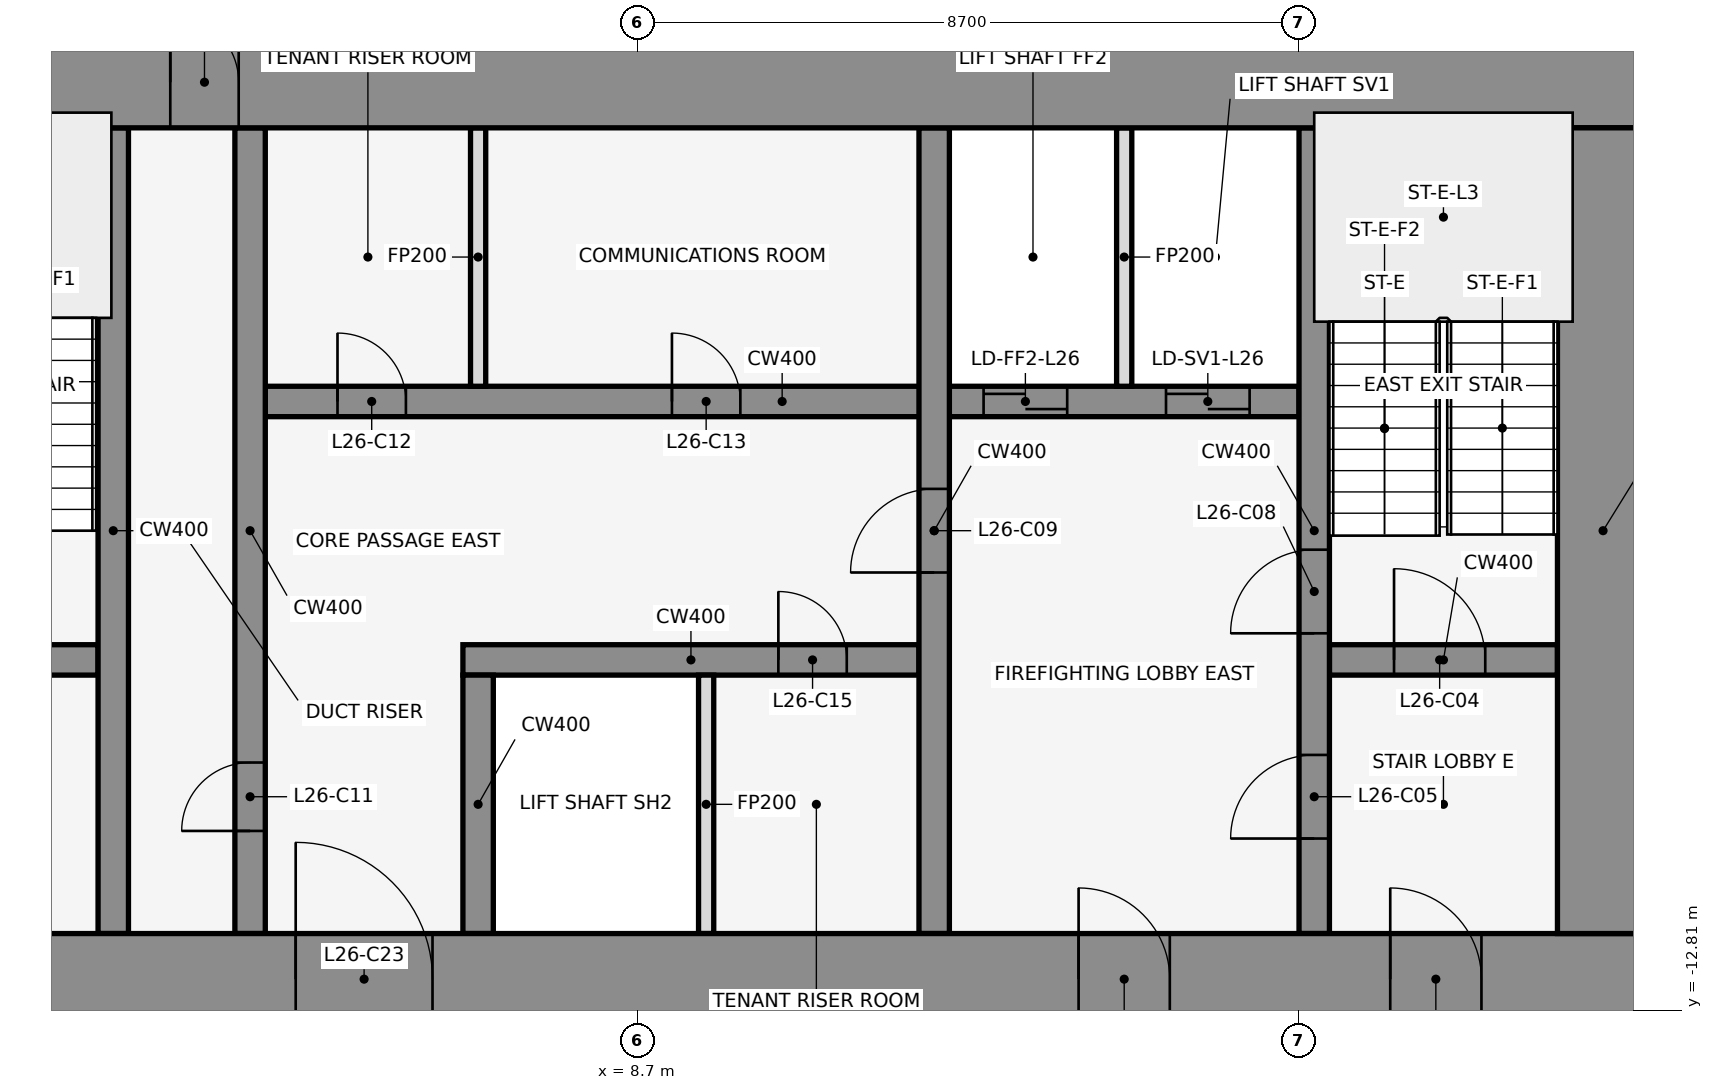
"""IFC4 building model, lengths in metres.
Left out: names, types, materials, properties, quantities, classifications, styles, units other than length and angle.
Written with IfcOpenShell. Run it as: python <this file> out.ifc"""

import sys

from ifc_helpers import new_model, si_unit, direction, frame, frame_2d, origin, place, context, subcontext, project, spatial, rectangle, extrude, element, fill, save


model = new_model("IFC4")
c1 = context("Model", 3, precision=1e-05, world=origin(), true_north=direction((0.0, 1.0)))
c2 = subcontext(c1, "Body", "Model", "MODEL_VIEW")
j1 = project(units=[si_unit("LENGTHUNIT", "METRE"), si_unit("PLANEANGLEUNIT", "RADIAN")], contexts=[c1])
p1 = place(None, origin())
s1 = spatial("IfcSite", under=j1, at=p1, CompositionType="ELEMENT")
p2 = place(p1, origin())
s2 = spatial("IfcBuilding", under=s1, at=p2, CompositionType="ELEMENT")
p3 = place(p2, frame((0.0, 0.0, 122.7)))
s3 = spatial("IfcBuildingStorey", under=s2, at=p3, CompositionType="ELEMENT", Elevation=122.7)
for number, where, z_axis, x_axis in (
    (1, (16.432, -0.105, 0.0), (0.0, 0.0, 1.0), (-0.84, 0.543, 0.0)),
    (2, (1.901, 1.08, 0.0), (0.0, 0.0, 1.0), (-0.84, -0.543, 0.0)),
):
    element("IfcWall", number, at=place(p3, frame(where, z_axis=z_axis, x_axis=x_axis)), inside=s3, PredefinedType="STANDARD", context=c2, shape_type="SweptSolid", body=[
        extrude(rectangle(XDim=2.183, YDim=0.25, at=frame_2d((1.091, 0.0))), origin(), (0.0, 0.0, 1.0), 3.95),
    ])
p4 = place(p3, frame((-1.6, -8.2, 0.0), z_axis=(0.0, 0.0, 1.0), x_axis=(1.0, 0.0, 0.0)))
e3 = element("IfcWall", 3, at=p4, inside=s3, PredefinedType="SHEAR", context=c2, shape_type="SweptSolid", body=[
    extrude(rectangle(XDim=3.2, YDim=0.4, at=frame_2d((1.6, 0.0))), origin(), (0.0, 0.0, 1.0), 4.1),
])
p5 = place(p4, frame((1.05, 0.0, 0.0)))
e4 = element("IfcOpeningElement", 4, at=p5, cuts=e3, PredefinedType="OPENING", context=c2, shape_type="SweptSolid", body=[
    extrude(rectangle(XDim=1.2, YDim=2.1, at=frame_2d((0.6, 1.05))), frame((0.0, 0.212, 0.0), z_axis=(0.0, -1.0, 0.0), x_axis=(1.0, 0.0, 0.0)), (0.0, 0.0, 1.0), 0.424),
])
p6 = place(p3, frame((6.4, -8.2, 0.0), z_axis=(0.0, 0.0, 1.0), x_axis=(1.0, 0.0, 0.0)))
e5 = element("IfcWall", 5, at=p6, inside=s3, PredefinedType="SHEAR", context=c2, shape_type="SweptSolid", body=[
    extrude(rectangle(XDim=6.0, YDim=0.4, at=frame_2d((3.0, 0.0))), origin(), (0.0, 0.0, 1.0), 4.1),
])
p7 = place(p6, frame((4.15, 0.0, 0.0)))
e6 = element("IfcOpeningElement", 6, at=p7, cuts=e5, PredefinedType="OPENING", context=c2, shape_type="SweptSolid", body=[
    extrude(rectangle(XDim=0.9, YDim=2.1, at=frame_2d((0.45, 1.05))), frame((0.0, 0.212, 0.0), z_axis=(0.0, -1.0, 0.0), x_axis=(1.0, 0.0, 0.0)), (0.0, 0.0, 1.0), 0.424),
])
p8 = place(p3, frame((17.8, -8.2, 0.0), z_axis=(0.0, 0.0, 1.0), x_axis=(1.0, 0.0, 0.0)))
e7 = element("IfcWall", 7, at=p8, inside=s3, PredefinedType="SHEAR", context=c2, shape_type="SweptSolid", body=[
    extrude(rectangle(XDim=3.0, YDim=0.4, at=frame_2d((1.5, 0.0))), origin(), (0.0, 0.0, 1.0), 4.1),
])
p9 = place(p8, frame((0.85, 0.0, 0.0)))
e8 = element("IfcOpeningElement", 8, at=p9, cuts=e7, PredefinedType="OPENING", context=c2, shape_type="SweptSolid", body=[
    extrude(rectangle(XDim=1.2, YDim=2.1, at=frame_2d((0.6, 1.05))), frame((0.0, 0.212, 0.0), z_axis=(0.0, -1.0, 0.0), x_axis=(1.0, 0.0, 0.0)), (0.0, 0.0, 1.0), 0.424),
])
p10 = place(p3, frame((3.8, -4.8, 0.0), z_axis=(0.0, 0.0, 1.0), x_axis=(1.0, 0.0, 0.0)))
e9 = element("IfcWall", 9, at=p10, inside=s3, PredefinedType="SHEAR", context=c2, shape_type="SweptSolid", body=[
    extrude(rectangle(XDim=13.6, YDim=0.4, at=frame_2d((6.8, 0.0))), origin(), (0.0, 0.0, 1.0), 4.1),
])
p11 = place(p10, frame((9.45, 0.0, 0.0)))
e10 = element("IfcOpeningElement", 10, at=p11, cuts=e9, PredefinedType="OPENING", context=c2, shape_type="SweptSolid", body=[
    extrude(rectangle(XDim=1.1, YDim=2.1, at=frame_2d((0.55, 1.05))), frame((0.0, 0.212, 0.0), z_axis=(0.0, -1.0, 0.0), x_axis=(1.0, 0.0, 0.0)), (0.0, 0.0, 1.0), 0.424),
])
p12 = place(p10, frame((11.85, 0.0, 0.0)))
e11 = element("IfcOpeningElement", 11, at=p12, cuts=e9, PredefinedType="OPENING", context=c2, shape_type="SweptSolid", body=[
    extrude(rectangle(XDim=1.1, YDim=2.1, at=frame_2d((0.55, 1.05))), frame((0.0, 0.212, 0.0), z_axis=(0.0, -1.0, 0.0), x_axis=(1.0, 0.0, 0.0)), (0.0, 0.0, 1.0), 0.424),
])
p13 = place(p10, frame((0.95, 0.0, 0.0)))
e12 = element("IfcOpeningElement", 12, at=p13, cuts=e9, PredefinedType="OPENING", context=c2, shape_type="SweptSolid", body=[
    extrude(rectangle(XDim=0.9, YDim=2.1, at=frame_2d((0.45, 1.05))), frame((0.0, 0.212, 0.0), z_axis=(0.0, -1.0, 0.0), x_axis=(1.0, 0.0, 0.0)), (0.0, 0.0, 1.0), 0.424),
])
p14 = place(p10, frame((5.35, 0.0, 0.0)))
e13 = element("IfcOpeningElement", 13, at=p14, cuts=e9, PredefinedType="OPENING", context=c2, shape_type="SweptSolid", body=[
    extrude(rectangle(XDim=0.9, YDim=2.1, at=frame_2d((0.45, 1.05))), frame((0.0, 0.212, 0.0), z_axis=(0.0, -1.0, 0.0), x_axis=(1.0, 0.0, 0.0)), (0.0, 0.0, 1.0), 0.424),
])
p15 = place(p3, frame((1.8, -11.8, 0.0), z_axis=(0.0, 0.0, 1.0), x_axis=(0.0, 1.0, 0.0)))
e14 = element("IfcWall", 14, at=p15, inside=s3, PredefinedType="SHEAR", context=c2, shape_type="SweptSolid", body=[
    extrude(rectangle(XDim=10.6, YDim=0.4, at=frame_2d((5.3, 0.0))), origin(), (0.0, 0.0, 1.0), 4.1),
])
p16 = place(p3, frame((3.6, -11.8, 0.0), z_axis=(0.0, 0.0, 1.0), x_axis=(0.0, 1.0, 0.0)))
e15 = element("IfcWall", 15, at=p16, inside=s3, PredefinedType="SHEAR", context=c2, shape_type="SweptSolid", body=[
    extrude(rectangle(XDim=10.6, YDim=0.4, at=frame_2d((5.3, 0.0))), origin(), (0.0, 0.0, 1.0), 4.1),
])
p17 = place(p16, frame((1.35, 0.0, 0.0)))
e16 = element("IfcOpeningElement", 16, at=p17, cuts=e15, PredefinedType="OPENING", context=c2, shape_type="SweptSolid", body=[
    extrude(rectangle(XDim=0.9, YDim=2.1, at=frame_2d((0.45, 1.05))), frame((0.0, 0.212, 0.0), z_axis=(0.0, -1.0, 0.0), x_axis=(1.0, 0.0, 0.0)), (0.0, 0.0, 1.0), 0.424),
])
p18 = place(p3, frame((6.6, -11.8, 0.0), z_axis=(0.0, 0.0, 1.0), x_axis=(0.0, 1.0, 0.0)))
e17 = element("IfcWall", 17, at=p18, inside=s3, PredefinedType="SHEAR", context=c2, shape_type="SweptSolid", body=[
    extrude(rectangle(XDim=3.4, YDim=0.4, at=frame_2d((1.7, 0.0))), origin(), (0.0, 0.0, 1.0), 4.1),
])
for number, where, z_axis, x_axis in (
    (18, (6.6, -4.6, 0.0), (0.0, 0.0, 1.0), (0.0, 1.0, 0.0)),
    (19, (9.6, -11.8, 0.0), (0.0, 0.0, 1.0), (0.0, 1.0, 0.0)),
):
    element("IfcWall", number, at=place(p3, frame(where, z_axis=z_axis, x_axis=x_axis)), inside=s3, PredefinedType="PARTITIONING", context=c2, shape_type="SweptSolid", body=[
        extrude(rectangle(XDim=3.4, YDim=0.2, at=frame_2d((1.7, 0.0))), origin(), (0.0, 0.0, 1.0), 3.018),
    ])
p19 = place(p3, frame((12.6, -11.8, 0.0), z_axis=(0.0, 0.0, 1.0), x_axis=(0.0, 1.0, 0.0)))
e20 = element("IfcWall", 20, at=p19, inside=s3, PredefinedType="SHEAR", context=c2, shape_type="SweptSolid", body=[
    extrude(rectangle(XDim=10.6, YDim=0.4, at=frame_2d((5.3, 0.0))), origin(), (0.0, 0.0, 1.0), 4.1),
])
p20 = place(p19, frame((4.75, 0.0, 0.0)))
e21 = element("IfcOpeningElement", 21, at=p20, cuts=e20, PredefinedType="OPENING", context=c2, shape_type="SweptSolid", body=[
    extrude(rectangle(XDim=1.1, YDim=2.1, at=frame_2d((0.55, 1.05))), frame((0.0, 0.212, 0.0), z_axis=(0.0, -1.0, 0.0), x_axis=(1.0, 0.0, 0.0)), (0.0, 0.0, 1.0), 0.424),
])
p21 = place(p3, frame((15.1, -4.6, 0.0), z_axis=(0.0, 0.0, 1.0), x_axis=(0.0, 1.0, 0.0)))
e22 = element("IfcWall", 22, at=p21, inside=s3, PredefinedType="PARTITIONING", context=c2, shape_type="SweptSolid", body=[
    extrude(rectangle(XDim=3.4, YDim=0.2, at=frame_2d((1.7, 0.0))), origin(), (0.0, 0.0, 1.0), 3.018),
])
p22 = place(p3, frame((17.6, -11.8, 0.0), z_axis=(0.0, 0.0, 1.0), x_axis=(0.0, 1.0, 0.0)))
e23 = element("IfcWall", 23, at=p22, inside=s3, PredefinedType="SHEAR", context=c2, shape_type="SweptSolid", body=[
    extrude(rectangle(XDim=10.6, YDim=0.4, at=frame_2d((5.3, 0.0))), origin(), (0.0, 0.0, 1.0), 4.1),
])
p23 = place(p22, frame((1.25, 0.0, 0.0)))
e24 = element("IfcOpeningElement", 24, at=p23, cuts=e23, PredefinedType="OPENING", context=c2, shape_type="SweptSolid", body=[
    extrude(rectangle(XDim=1.1, YDim=2.1, at=frame_2d((0.55, 1.05))), frame((0.0, 0.212, 0.0), z_axis=(0.0, -1.0, 0.0), x_axis=(1.0, 0.0, 0.0)), (0.0, 0.0, 1.0), 0.424),
])
p24 = place(p22, frame((3.95, 0.0, 0.0)))
e25 = element("IfcOpeningElement", 25, at=p24, cuts=e23, PredefinedType="OPENING", context=c2, shape_type="SweptSolid", body=[
    extrude(rectangle(XDim=1.1, YDim=2.1, at=frame_2d((0.55, 1.05))), frame((0.0, 0.212, 0.0), z_axis=(0.0, -1.0, 0.0), x_axis=(1.0, 0.0, 0.0)), (0.0, 0.0, 1.0), 0.424),
])
p25 = place(p3, frame((-22.0, -0.6, 0.0), z_axis=(0.0, 0.0, 1.0), x_axis=(1.0, 0.0, 0.0)))
e26 = element("IfcWall", 26, at=p25, inside=s3, PredefinedType="SHEAR", context=c2, shape_type="SweptSolid", body=[
    extrude(rectangle(XDim=44.0, YDim=1.2, at=frame_2d((22.0, 0.0))), origin(), (0.0, 0.0, 1.0), 4.1),
])
p26 = place(p25, frame((18.55, 0.0, 0.0)))
e27 = element("IfcOpeningElement", 27, at=p26, cuts=e26, PredefinedType="OPENING", context=c2, shape_type="SweptSolid", body=[
    extrude(rectangle(XDim=0.9, YDim=2.1, at=frame_2d((0.45, 1.05))), frame((0.0, 0.612, 0.0), z_axis=(0.0, -1.0, 0.0), x_axis=(1.0, 0.0, 0.0)), (0.0, 0.0, 1.0), 1.224),
])
p27 = place(p25, frame((24.55, 0.0, 0.0)))
e28 = element("IfcOpeningElement", 28, at=p27, cuts=e26, PredefinedType="OPENING", context=c2, shape_type="SweptSolid", body=[
    extrude(rectangle(XDim=0.9, YDim=2.1, at=frame_2d((0.45, 1.05))), frame((0.0, 0.612, 0.0), z_axis=(0.0, -1.0, 0.0), x_axis=(1.0, 0.0, 0.0)), (0.0, 0.0, 1.0), 1.224),
])
p28 = place(p3, frame((-22.0, -12.4, 0.0), z_axis=(0.0, 0.0, 1.0), x_axis=(1.0, 0.0, 0.0)))
e29 = element("IfcWall", 29, at=p28, inside=s3, PredefinedType="SHEAR", context=c2, shape_type="SweptSolid", body=[
    extrude(rectangle(XDim=44.0, YDim=1.2, at=frame_2d((22.0, 0.0))), origin(), (0.0, 0.0, 1.0), 4.1),
])
p29 = place(p28, frame((2.2, 0.0, 0.0)))
e30 = element("IfcOpeningElement", 30, at=p29, cuts=e29, PredefinedType="OPENING", context=c2, shape_type="SweptSolid", body=[
    extrude(rectangle(XDim=1.2, YDim=2.1, at=frame_2d((0.6, 1.05))), frame((0.0, 0.612, 0.0), z_axis=(0.0, -1.0, 0.0), x_axis=(1.0, 0.0, 0.0)), (0.0, 0.0, 1.0), 1.224),
])
p30 = place(p28, frame((21.4, 0.0, 0.0)))
e31 = element("IfcOpeningElement", 31, at=p30, cuts=e29, PredefinedType="OPENING", context=c2, shape_type="SweptSolid", body=[
    extrude(rectangle(XDim=1.2, YDim=2.1, at=frame_2d((0.6, 1.05))), frame((0.0, 0.612, 0.0), z_axis=(0.0, -1.0, 0.0), x_axis=(1.0, 0.0, 0.0)), (0.0, 0.0, 1.0), 1.224),
])
p31 = place(p28, frame((40.6, 0.0, 0.0)))
e32 = element("IfcOpeningElement", 32, at=p31, cuts=e29, PredefinedType="OPENING", context=c2, shape_type="SweptSolid", body=[
    extrude(rectangle(XDim=1.2, YDim=2.1, at=frame_2d((0.6, 1.05))), frame((0.0, 0.612, 0.0), z_axis=(0.0, -1.0, 0.0), x_axis=(1.0, 0.0, 0.0)), (0.0, 0.0, 1.0), 1.224),
])
p32 = place(p28, frame((16.0, 0.0, 0.0)))
e33 = element("IfcOpeningElement", 33, at=p32, cuts=e29, PredefinedType="OPENING", context=c2, shape_type="SweptSolid", body=[
    extrude(rectangle(XDim=1.8, YDim=2.1, at=frame_2d((0.9, 1.05))), frame((0.0, 0.612, 0.0), z_axis=(0.0, -1.0, 0.0), x_axis=(1.0, 0.0, 0.0)), (0.0, 0.0, 1.0), 1.224),
])
p33 = place(p28, frame((6.3, 0.0, 0.0)))
e34 = element("IfcOpeningElement", 34, at=p33, cuts=e29, PredefinedType="OPENING", context=c2, shape_type="SweptSolid", body=[
    extrude(rectangle(XDim=1.2, YDim=2.1, at=frame_2d((0.6, 1.05))), frame((0.0, 0.612, 0.0), z_axis=(0.0, -1.0, 0.0), x_axis=(1.0, 0.0, 0.0)), (0.0, 0.0, 1.0), 1.224),
])
p34 = place(p28, frame((26.2, 0.0, 0.0)))
e35 = element("IfcOpeningElement", 35, at=p34, cuts=e29, PredefinedType="OPENING", context=c2, shape_type="SweptSolid", body=[
    extrude(rectangle(XDim=1.8, YDim=2.1, at=frame_2d((0.9, 1.05))), frame((0.0, 0.612, 0.0), z_axis=(0.0, -1.0, 0.0), x_axis=(1.0, 0.0, 0.0)), (0.0, 0.0, 1.0), 1.224),
])
p35 = place(p28, frame((36.5, 0.0, 0.0)))
e36 = element("IfcOpeningElement", 36, at=p35, cuts=e29, PredefinedType="OPENING", context=c2, shape_type="SweptSolid", body=[
    extrude(rectangle(XDim=1.2, YDim=2.1, at=frame_2d((0.6, 1.05))), frame((0.0, 0.612, 0.0), z_axis=(0.0, -1.0, 0.0), x_axis=(1.0, 0.0, 0.0)), (0.0, 0.0, 1.0), 1.224),
])
p36 = place(p3, frame((21.4, -11.8, 0.0), z_axis=(0.0, 0.0, 1.0), x_axis=(0.0, 1.0, 0.0)))
e37 = element("IfcWall", 37, at=p36, inside=s3, PredefinedType="SHEAR", context=c2, shape_type="SweptSolid", body=[
    extrude(rectangle(XDim=10.6, YDim=1.2, at=frame_2d((5.3, 0.0))), origin(), (0.0, 0.0, 1.0), 4.1),
])
p37 = place(p9, origin())
e38 = element("IfcDoor", 38, at=p37, inside=s3, OperationType="SINGLE_SWING_RIGHT", PredefinedType="DOOR", context=c2, shape_type="SweptSolid", body=[
    extrude(rectangle(XDim=1.2, YDim=2.1, at=frame_2d((0.6, 1.05))), frame((0.0, 0.025, 0.0), z_axis=(0.0, -1.0, 0.0), x_axis=(1.0, 0.0, 0.0)), (0.0, 0.0, 1.0), 0.05),
])
fill(e8, e38)
p38 = place(p23, origin())
e39 = element("IfcDoor", 39, at=p38, inside=s3, OperationType="SINGLE_SWING_LEFT", PredefinedType="DOOR", context=c2, shape_type="SweptSolid", body=[
    extrude(rectangle(XDim=1.1, YDim=2.1, at=frame_2d((0.55, 1.05))), frame((0.0, 0.025, 0.0), z_axis=(0.0, -1.0, 0.0), x_axis=(1.0, 0.0, 0.0)), (0.0, 0.0, 1.0), 0.05),
])
fill(e24, e39)
p39 = place(p11, origin())
e40 = element("IfcDoor", 40, at=p39, inside=s3, OperationType="DOUBLE_DOOR_SLIDING", PredefinedType="DOOR", context=c2, shape_type="SweptSolid", body=[
    extrude(rectangle(XDim=1.1, YDim=2.1, at=frame_2d((0.55, 1.05))), frame((0.0, 0.025, 0.0), z_axis=(0.0, -1.0, 0.0), x_axis=(1.0, 0.0, 0.0)), (0.0, 0.0, 1.0), 0.05),
])
fill(e10, e40)
p40 = place(p12, origin())
e41 = element("IfcDoor", 41, at=p40, inside=s3, OperationType="DOUBLE_DOOR_SLIDING", PredefinedType="DOOR", context=c2, shape_type="SweptSolid", body=[
    extrude(rectangle(XDim=1.1, YDim=2.1, at=frame_2d((0.55, 1.05))), frame((0.0, 0.025, 0.0), z_axis=(0.0, -1.0, 0.0), x_axis=(1.0, 0.0, 0.0)), (0.0, 0.0, 1.0), 0.05),
])
fill(e11, e41)
p41 = place(p24, origin())
e42 = element("IfcDoor", 42, at=p41, inside=s3, OperationType="SINGLE_SWING_RIGHT", PredefinedType="DOOR", context=c2, shape_type="SweptSolid", body=[
    extrude(rectangle(XDim=1.1, YDim=2.1, at=frame_2d((0.55, 1.05))), frame((0.0, 0.025, 0.0), z_axis=(0.0, -1.0, 0.0), x_axis=(1.0, 0.0, 0.0)), (0.0, 0.0, 1.0), 0.05),
])
fill(e25, e42)
p42 = place(p20, frame((1.1, 0.0, 0.0), z_axis=(0.0, 0.0, 1.0), x_axis=(-1.0, 0.0, 0.0)))
e43 = element("IfcDoor", 43, at=p42, inside=s3, OperationType="SINGLE_SWING_RIGHT", PredefinedType="DOOR", context=c2, shape_type="SweptSolid", body=[
    extrude(rectangle(XDim=1.1, YDim=2.1, at=frame_2d((0.55, 1.05))), frame((0.0, 0.025, 0.0), z_axis=(0.0, -1.0, 0.0), x_axis=(1.0, 0.0, 0.0)), (0.0, 0.0, 1.0), 0.05),
])
fill(e21, e43)
p43 = place(p17, origin())
e44 = element("IfcDoor", 44, at=p43, inside=s3, OperationType="SINGLE_SWING_LEFT", PredefinedType="DOOR", context=c2, shape_type="SweptSolid", body=[
    extrude(rectangle(XDim=0.9, YDim=2.1, at=frame_2d((0.45, 1.05))), frame((0.0, 0.025, 0.0), z_axis=(0.0, -1.0, 0.0), x_axis=(1.0, 0.0, 0.0)), (0.0, 0.0, 1.0), 0.05),
])
fill(e16, e44)
p44 = place(p13, origin())
e45 = element("IfcDoor", 45, at=p44, inside=s3, OperationType="SINGLE_SWING_RIGHT", PredefinedType="DOOR", context=c2, shape_type="SweptSolid", body=[
    extrude(rectangle(XDim=0.9, YDim=2.1, at=frame_2d((0.45, 1.05))), frame((0.0, 0.025, 0.0), z_axis=(0.0, -1.0, 0.0), x_axis=(1.0, 0.0, 0.0)), (0.0, 0.0, 1.0), 0.05),
])
fill(e12, e45)
p45 = place(p14, origin())
e46 = element("IfcDoor", 46, at=p45, inside=s3, OperationType="SINGLE_SWING_LEFT", PredefinedType="DOOR", context=c2, shape_type="SweptSolid", body=[
    extrude(rectangle(XDim=0.9, YDim=2.1, at=frame_2d((0.45, 1.05))), frame((0.0, 0.025, 0.0), z_axis=(0.0, -1.0, 0.0), x_axis=(1.0, 0.0, 0.0)), (0.0, 0.0, 1.0), 0.05),
])
fill(e13, e46)
p46 = place(p7, frame((0.9, 0.0, 0.0), z_axis=(0.0, 0.0, 1.0), x_axis=(-1.0, 0.0, 0.0)))
e47 = element("IfcDoor", 47, at=p46, inside=s3, OperationType="SINGLE_SWING_RIGHT", PredefinedType="DOOR", context=c2, shape_type="SweptSolid", body=[
    extrude(rectangle(XDim=0.9, YDim=2.1, at=frame_2d((0.45, 1.05))), frame((0.0, 0.025, 0.0), z_axis=(0.0, -1.0, 0.0), x_axis=(1.0, 0.0, 0.0)), (0.0, 0.0, 1.0), 0.05),
])
fill(e6, e47)
p47 = place(p27, origin())
e48 = element("IfcDoor", 48, at=p47, inside=s3, OperationType="SINGLE_SWING_LEFT", PredefinedType="DOOR", context=c2, shape_type="SweptSolid", body=[
    extrude(rectangle(XDim=0.9, YDim=2.1, at=frame_2d((0.45, 1.05))), frame((0.0, 0.025, 0.0), z_axis=(0.0, -1.0, 0.0), x_axis=(1.0, 0.0, 0.0)), (0.0, 0.0, 1.0), 0.05),
])
fill(e28, e48)
p48 = place(p31, frame((1.2, 0.0, 0.0), z_axis=(0.0, 0.0, 1.0), x_axis=(-1.0, 0.0, 0.0)))
e49 = element("IfcDoor", 49, at=p48, inside=s3, OperationType="SINGLE_SWING_RIGHT", PredefinedType="DOOR", context=c2, shape_type="SweptSolid", body=[
    extrude(rectangle(XDim=1.2, YDim=2.1, at=frame_2d((0.6, 1.05))), frame((0.0, 0.025, 0.0), z_axis=(0.0, -1.0, 0.0), x_axis=(1.0, 0.0, 0.0)), (0.0, 0.0, 1.0), 0.05),
])
fill(e32, e49)
p49 = place(p34, origin())
e50 = element("IfcDoor", 50, at=p49, inside=s3, OperationType="SINGLE_SWING_LEFT", PredefinedType="DOOR", context=c2, shape_type="SweptSolid", body=[
    extrude(rectangle(XDim=1.8, YDim=2.1, at=frame_2d((0.9, 1.05))), frame((0.0, 0.025, 0.0), z_axis=(0.0, -1.0, 0.0), x_axis=(1.0, 0.0, 0.0)), (0.0, 0.0, 1.0), 0.05),
])
fill(e35, e50)
p50 = place(p35, frame((1.2, 0.0, 0.0), z_axis=(0.0, 0.0, 1.0), x_axis=(-1.0, 0.0, 0.0)))
e51 = element("IfcDoor", 51, at=p50, inside=s3, OperationType="SINGLE_SWING_RIGHT", PredefinedType="DOOR", context=c2, shape_type="SweptSolid", body=[
    extrude(rectangle(XDim=1.2, YDim=2.1, at=frame_2d((0.6, 1.05))), frame((0.0, 0.025, 0.0), z_axis=(0.0, -1.0, 0.0), x_axis=(1.0, 0.0, 0.0)), (0.0, 0.0, 1.0), 0.05),
])
fill(e36, e51)
save(model, sys.argv[1])
